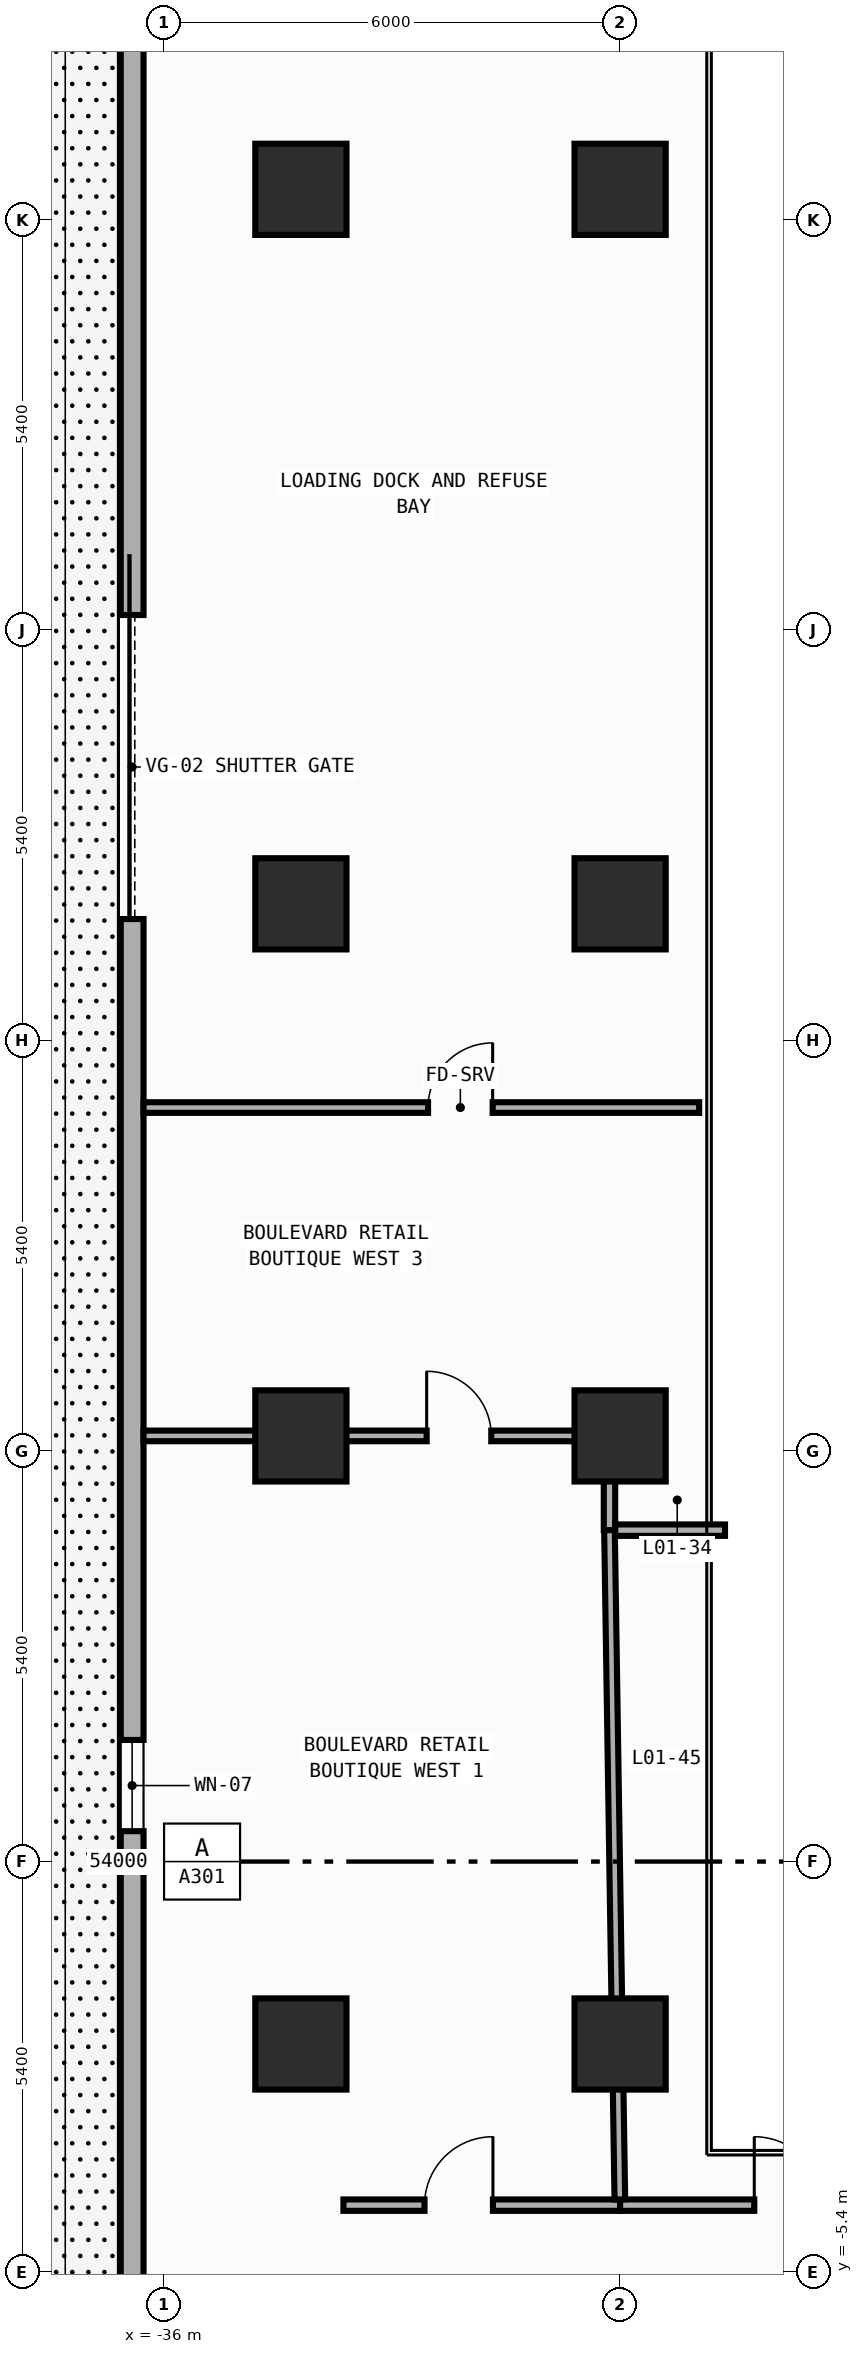
"""IFC4 building model, lengths in metres.
Left out: names, types, materials, properties, quantities, classifications, styles, units other than length and angle.
Written with IfcOpenShell. Run it as: python <this file> out.ifc"""

import sys

from ifc_helpers import new_model, si_unit, direction, frame, frame_2d, origin, origin_2d, place, context, subcontext, project, spatial, rectangle, extrude, element, fill, save


model = new_model("IFC4")
c1 = context("Model", 3, precision=1e-05, world=origin(), true_north=direction((0.0, 1.0)))
c2 = subcontext(c1, "Body", "Model", "MODEL_VIEW")
j1 = project(units=[si_unit("LENGTHUNIT", "METRE"), si_unit("PLANEANGLEUNIT", "RADIAN")], contexts=[c1])
p1 = place(None, origin())
s1 = spatial("IfcSite", under=j1, at=p1, CompositionType="ELEMENT")
p2 = place(p1, origin())
s2 = spatial("IfcBuilding", under=s1, at=p2, CompositionType="ELEMENT")
p3 = place(p2, origin())
s3 = spatial("IfcBuildingStorey", under=s2, at=p3, CompositionType="ELEMENT", Elevation=0.0)
for number, where, z_axis, x_axis in (
    (1, (-34.2, -2.4, 0.0), (0.0, 0.0, 1.0), (1.0, 0.0, 0.0)),
    (2, (-34.2, 5.6, 0.0), (0.0, 0.0, 1.0), (1.0, 0.0, 0.0)),
    (3, (-34.2, 12.6, 0.0), (0.0, 0.0, 1.0), (1.0, 0.0, 0.0)),
    (4, (-34.2, 22.0, 0.0), (0.0, 0.0, 1.0), (1.0, 0.0, 0.0)),
    (5, (-30.0, -2.4, 0.0), (0.0, 0.0, 1.0), (1.0, 0.0, 0.0)),
    (6, (-30.0, 5.6, 0.0), (0.0, 0.0, 1.0), (1.0, 0.0, 0.0)),
    (7, (-30.0, 12.6, 0.0), (0.0, 0.0, 1.0), (1.0, 0.0, 0.0)),
    (8, (-30.0, 22.0, 0.0), (0.0, 0.0, 1.0), (1.0, 0.0, 0.0)),
):
    element("IfcColumn", number, at=place(p3, frame(where, z_axis=z_axis, x_axis=x_axis)), inside=s3, PredefinedType="COLUMN", context=c2, shape_type="SweptSolid", body=[
        extrude(rectangle(XDim=1.2, YDim=1.2, at=origin_2d()), origin(), (0.0, 0.0, 1.0), 6.0),
    ])
p4 = place(p3, frame((-36.42, -25.6, 0.0), z_axis=(0.0, 0.0, 1.0), x_axis=(0.0, 1.0, 0.0)))
e9 = element("IfcWall", 9, at=p4, inside=s3, PredefinedType="STANDARD", context=c2, shape_type="SweptSolid", body=[
    extrude(rectangle(XDim=51.2, YDim=0.3, at=frame_2d((25.6, 0.0))), origin(), (0.0, 0.0, 1.0), 5.7),
])
p5 = place(p4, frame((38.0, 0.0, 0.0)))
e10 = element("IfcOpeningElement", 10, at=p5, cuts=e9, PredefinedType="OPENING", context=c2, shape_type="SweptSolid", body=[
    extrude(rectangle(XDim=4.0, YDim=4.0, at=frame_2d((2.0, 2.0))), frame((0.0, 0.16, 0.0), z_axis=(0.0, -1.0, 0.0), x_axis=(1.0, 0.0, 0.0)), (0.0, 0.0, 1.0), 0.32),
])
p6 = place(p4, frame((6.5, 0.0, 0.85)))
e11 = element("IfcOpeningElement", 11, at=p6, cuts=e9, PredefinedType="OPENING", context=c2, shape_type="SweptSolid", body=[
    extrude(rectangle(XDim=1.5, YDim=1.8, at=frame_2d((0.75, 0.9))), frame((0.0, 0.16, 0.0), z_axis=(0.0, -1.0, 0.0), x_axis=(1.0, 0.0, 0.0)), (0.0, 0.0, 1.0), 0.32),
])
p7 = place(p4, frame((18.5, 0.0, 0.85)))
e12 = element("IfcOpeningElement", 12, at=p7, cuts=e9, PredefinedType="OPENING", context=c2, shape_type="SweptSolid", body=[
    extrude(rectangle(XDim=1.35, YDim=1.75, at=frame_2d((0.675, 0.875))), frame((0.0, 0.16, 0.0), z_axis=(0.0, -1.0, 0.0), x_axis=(1.0, 0.0, 0.0)), (0.0, 0.0, 1.0), 0.32),
])
p8 = place(p4, frame((26.0, 0.0, 0.85)))
e13 = element("IfcOpeningElement", 13, at=p8, cuts=e9, PredefinedType="OPENING", context=c2, shape_type="SweptSolid", body=[
    extrude(rectangle(XDim=1.2, YDim=1.65, at=frame_2d((0.6, 0.825))), frame((0.0, 0.16, 0.0), z_axis=(0.0, -1.0, 0.0), x_axis=(1.0, 0.0, 0.0)), (0.0, 0.0, 1.0), 0.32),
])
p9 = place(p3, frame((-30.14, 4.36, 0.0), z_axis=(0.0, 0.0, 1.0), x_axis=(0.0, 1.0, 0.0)))
e14 = element("IfcWall", 14, at=p9, inside=s3, PredefinedType="PARTITIONING", context=c2, shape_type="SweptSolid", body=[
    extrude(rectangle(XDim=1.31, YDim=0.15, at=frame_2d((0.655, 0.0))), origin(), (0.0, 0.0, 1.0), 4.8),
])
p10 = place(p3, frame((-30.065, 4.36, 0.0), z_axis=(0.0, 0.0, 1.0), x_axis=(1.0, 0.0, 0.0)))
e15 = element("IfcWall", 15, at=p10, inside=s3, PredefinedType="PARTITIONING", context=c2, shape_type="SweptSolid", body=[
    extrude(rectangle(XDim=1.445, YDim=0.15, at=frame_2d((0.722, 0.0))), origin(), (0.0, 0.0, 1.0), 5.7),
])
p11 = place(p3, frame((-33.64, -4.52, 0.0), z_axis=(0.0, 0.0, 1.0), x_axis=(1.0, 0.0, 0.0)))
e16 = element("IfcWall", 16, at=p11, inside=s3, PredefinedType="PARTITIONING", context=c2, shape_type="SweptSolid", body=[
    extrude(rectangle(XDim=3.64, YDim=0.15, at=frame_2d((1.82, 0.0))), origin(), (0.0, 0.0, 1.0), 5.7),
])
p12 = place(p11, frame((1.067, 0.0, 0.0)))
e17 = element("IfcOpeningElement", 17, at=p12, cuts=e16, PredefinedType="OPENING", context=c2, shape_type="SweptSolid", body=[
    extrude(rectangle(XDim=0.9, YDim=2.15, at=frame_2d((0.45, 1.075))), frame((0.0, 0.085, 0.0), z_axis=(0.0, -1.0, 0.0), x_axis=(1.0, 0.0, 0.0)), (0.0, 0.0, 1.0), 0.17),
])
p13 = place(p3, frame((-30.0, -4.52, 0.0), z_axis=(0.0, 0.0, 1.0), x_axis=(1.0, 0.0, 0.0)))
e18 = element("IfcWall", 18, at=p13, inside=s3, PredefinedType="PARTITIONING", context=c2, shape_type="SweptSolid", body=[
    extrude(rectangle(XDim=3.125, YDim=0.15, at=frame_2d((1.562, 0.0))), origin(), (0.0, 0.0, 1.0), 5.7),
])
p14 = place(p13, frame((1.765, 0.0, 0.0)))
e19 = element("IfcOpeningElement", 19, at=p14, cuts=e18, PredefinedType="OPENING", context=c2, shape_type="SweptSolid", body=[
    extrude(rectangle(XDim=0.9, YDim=2.15, at=frame_2d((0.45, 1.075))), frame((0.0, 0.085, 0.0), z_axis=(0.0, -1.0, 0.0), x_axis=(1.0, 0.0, 0.0)), (0.0, 0.0, 1.0), 0.17),
])
p15 = place(p3, frame((-36.27, 9.92, 0.0), z_axis=(0.0, 0.0, 1.0), x_axis=(1.0, 0.0, 0.0)))
e20 = element("IfcWall", 20, at=p15, inside=s3, PredefinedType="PARTITIONING", context=c2, shape_type="SweptSolid", body=[
    extrude(rectangle(XDim=7.31, YDim=0.14, at=frame_2d((3.655, 0.0))), origin(), (0.0, 0.0, 1.0), 5.7),
])
p16 = place(p15, frame((3.743, 0.0, 0.0)))
e21 = element("IfcOpeningElement", 21, at=p16, cuts=e20, PredefinedType="OPENING", context=c2, shape_type="SweptSolid", body=[
    extrude(rectangle(XDim=0.85, YDim=2.1, at=frame_2d((0.425, 1.05))), frame((0.0, 0.08, 0.0), z_axis=(0.0, -1.0, 0.0), x_axis=(1.0, 0.0, 0.0)), (0.0, 0.0, 1.0), 0.16),
])
p17 = place(p3, frame((-30.004, -4.445, 0.0), z_axis=(0.0, 0.0, 1.0), x_axis=(-0.015469783933, 0.999880335733, 0.0)))
e22 = element("IfcWall", 22, at=p17, inside=s3, PredefinedType="PARTITIONING", context=c2, shape_type="SweptSolid", body=[
    extrude(rectangle(XDim=8.806, YDim=0.14, at=frame_2d((4.403, 0.0))), origin(), (0.0, 0.0, 1.0), 4.8),
])
p18 = place(p3, frame((-36.27, 5.6, 0.0), z_axis=(0.0, 0.0, 1.0), x_axis=(1.0, 0.0, 0.0)))
e23 = element("IfcWall", 23, at=p18, inside=s3, PredefinedType="PARTITIONING", context=c2, shape_type="SweptSolid", body=[
    extrude(rectangle(XDim=6.055, YDim=0.14, at=frame_2d((3.027, 0.0))), origin(), (0.0, 0.0, 1.0), 4.8),
])
p19 = place(p18, frame((3.725, 0.0, 0.0)))
e24 = element("IfcOpeningElement", 24, at=p19, cuts=e23, PredefinedType="OPENING", context=c2, shape_type="SweptSolid", body=[
    extrude(rectangle(XDim=0.85, YDim=2.1, at=frame_2d((0.425, 1.05))), frame((0.0, 0.08, 0.0), z_axis=(0.0, -1.0, 0.0), x_axis=(1.0, 0.0, 0.0)), (0.0, 0.0, 1.0), 0.16),
])
p20 = place(p5, origin())
e25 = element("IfcDoor", 25, at=p20, inside=s3, OperationType="SLIDING_TO_LEFT", PredefinedType="GATE", context=c2, shape_type="SweptSolid", body=[
    extrude(rectangle(XDim=4.0, YDim=4.0, at=frame_2d((2.0, 2.0))), frame((0.0, 0.025, 0.0), z_axis=(0.0, -1.0, 0.0), x_axis=(1.0, 0.0, 0.0)), (0.0, 0.0, 1.0), 0.05),
])
fill(e10, e25)
p21 = place(p8, origin())
e26 = element("IfcWindow", 26, at=p21, inside=s3, PartitioningType="SINGLE_PANEL", PredefinedType="WINDOW", context=c2, shape_type="SweptSolid", body=[
    extrude(rectangle(XDim=1.2, YDim=1.65, at=frame_2d((0.6, 0.825))), frame((0.0, 0.03, 0.0), z_axis=(0.0, -1.0, 0.0), x_axis=(1.0, 0.0, 0.0)), (0.0, 0.0, 1.0), 0.06),
])
fill(e13, e26)
p22 = place(p12, origin())
e27 = element("IfcDoor", 27, at=p22, inside=s3, OperationType="SINGLE_SWING_RIGHT", PredefinedType="DOOR", context=c2, shape_type="SweptSolid", body=[
    extrude(rectangle(XDim=0.9, YDim=2.15, at=frame_2d((0.45, 1.075))), frame((0.0, 0.025, 0.0), z_axis=(0.0, -1.0, 0.0), x_axis=(1.0, 0.0, 0.0)), (0.0, 0.0, 1.0), 0.05),
])
fill(e17, e27)
p23 = place(p14, origin())
e28 = element("IfcDoor", 28, at=p23, inside=s3, OperationType="SINGLE_SWING_LEFT", PredefinedType="DOOR", context=c2, shape_type="SweptSolid", body=[
    extrude(rectangle(XDim=0.9, YDim=2.15, at=frame_2d((0.45, 1.075))), frame((0.0, 0.025, 0.0), z_axis=(0.0, -1.0, 0.0), x_axis=(1.0, 0.0, 0.0)), (0.0, 0.0, 1.0), 0.05),
])
fill(e19, e28)
p24 = place(p19, origin())
e29 = element("IfcDoor", 29, at=p24, inside=s3, OperationType="SINGLE_SWING_LEFT", PredefinedType="DOOR", context=c2, shape_type="SweptSolid", body=[
    extrude(rectangle(XDim=0.85, YDim=2.1, at=frame_2d((0.425, 1.05))), frame((0.0, 0.025, 0.0), z_axis=(0.0, -1.0, 0.0), x_axis=(1.0, 0.0, 0.0)), (0.0, 0.0, 1.0), 0.05),
])
fill(e24, e29)
p25 = place(p16, origin())
e30 = element("IfcDoor", 30, at=p25, inside=s3, OperationType="SINGLE_SWING_RIGHT", PredefinedType="DOOR", context=c2, shape_type="SweptSolid", body=[
    extrude(rectangle(XDim=0.85, YDim=2.1, at=frame_2d((0.425, 1.05))), frame((0.0, 0.025, 0.0), z_axis=(0.0, -1.0, 0.0), x_axis=(1.0, 0.0, 0.0)), (0.0, 0.0, 1.0), 0.05),
])
fill(e21, e30)
save(model, sys.argv[1])
